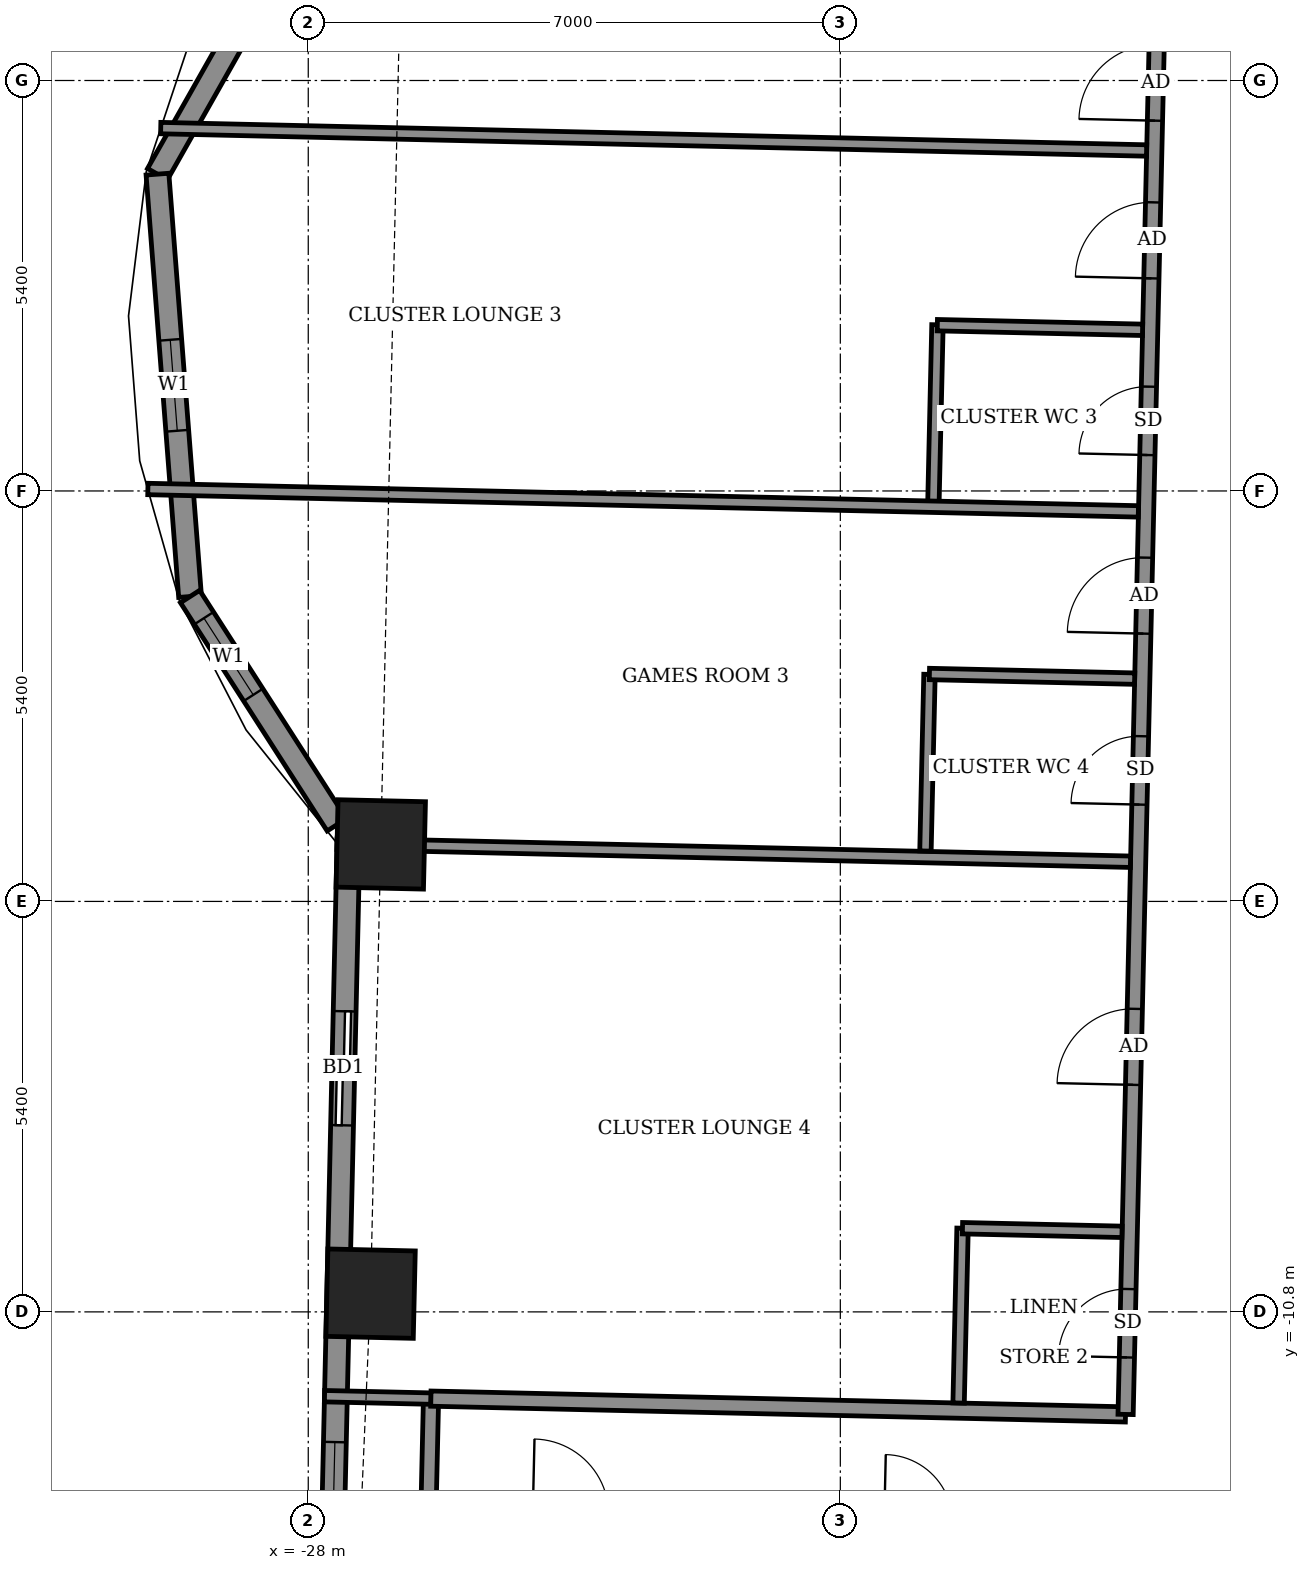
"""IFC4 building model, lengths in metres.
Left out: names, types, materials, properties, quantities, classifications, styles, units other than length and angle.
Written with IfcOpenShell. Run it as: python <this file> out.ifc"""

import sys

from ifc_helpers import new_model, si_unit, direction, frame, frame_2d, origin, origin_2d, place, context, subcontext, project, spatial, rectangle, extrude, element, fill, save


model = new_model("IFC4")
c1 = context("Model", 3, precision=1e-05, world=origin(), true_north=direction((0.0, 1.0)))
c2 = subcontext(c1, "Body", "Model", "MODEL_VIEW")
j1 = project(units=[si_unit("LENGTHUNIT", "METRE"), si_unit("PLANEANGLEUNIT", "RADIAN")], contexts=[c1])
p1 = place(None, origin())
s1 = spatial("IfcSite", under=j1, at=p1, CompositionType="ELEMENT")
p2 = place(p1, origin())
s2 = spatial("IfcBuilding", under=s1, at=p2, CompositionType="ELEMENT")
p3 = place(p2, frame((0.0, 0.0, 197.9)))
s3 = spatial("IfcBuildingStorey", under=s2, at=p3, CompositionType="ELEMENT", Elevation=197.9)
for number, where, z_axis, x_axis in (
    (1, (-27.046, -4.65, -0.55), (0.0, 0.0, 1.0), (-0.023, -1.0, 0.0)),
    (2, (-27.18, -10.56, -0.55), (0.0, 0.0, 1.0), (-0.023, -1.0, 0.0)),
):
    element("IfcColumn", number, at=place(p3, frame(where, z_axis=z_axis, x_axis=x_axis)), inside=s3, PredefinedType="COLUMN", context=c2, shape_type="SweptSolid", body=[
        extrude(rectangle(XDim=1.15, YDim=1.15, at=origin_2d()), origin(), (0.0, 0.0, 1.0), 3.6),
    ])
p4 = place(p3, frame((-27.325, 8.866, 0.0), z_axis=(0.0, 0.0, 1.0), x_axis=(-0.492554919955, -0.870281363025, 0.0)))
e3 = element("IfcWall", 3, at=p4, inside=s3, PredefinedType="SOLIDWALL", context=c2, shape_type="SweptSolid", body=[
    extrude(rectangle(XDim=5.398, YDim=0.3, at=frame_2d((2.699, 0.0))), origin(), (0.0, 0.0, 1.0), 3.05),
])
p5 = place(p4, frame((2.008, 0.0, 0.9)))
e4 = element("IfcOpeningElement", 4, at=p5, cuts=e3, PredefinedType="OPENING", context=c2, shape_type="SweptSolid", body=[
    extrude(rectangle(XDim=1.2, YDim=1.5, at=frame_2d((0.6, 0.75))), frame((0.0, 0.16, 0.0), z_axis=(0.0, -1.0, 0.0), x_axis=(1.0, 0.0, 0.0)), (0.0, 0.0, 1.0), 0.32),
])
p6 = place(p3, frame((-29.984, 4.168, 0.0), z_axis=(0.0, 0.0, 1.0), x_axis=(0.076964476481, -0.997033835614, 0.0)))
e5 = element("IfcWall", 5, at=p6, inside=s3, PredefinedType="SOLIDWALL", context=c2, shape_type="SweptSolid", body=[
    extrude(rectangle(XDim=5.573, YDim=0.3, at=frame_2d((2.787, 0.0))), origin(), (0.0, 0.0, 1.0), 3.05),
])
p7 = place(p6, frame((2.186, 0.0, 0.9)))
e6 = element("IfcOpeningElement", 6, at=p7, cuts=e5, PredefinedType="OPENING", context=c2, shape_type="SweptSolid", body=[
    extrude(rectangle(XDim=1.2, YDim=1.5, at=frame_2d((0.6, 0.75))), frame((0.0, 0.16, 0.0), z_axis=(0.0, -1.0, 0.0), x_axis=(1.0, 0.0, 0.0)), (0.0, 0.0, 1.0), 0.32),
])
p8 = place(p3, frame((-29.555, -1.389, 0.0), z_axis=(0.0, 0.0, 1.0), x_axis=(0.540622779574, -0.8412651248, 0.0)))
e7 = element("IfcWall", 7, at=p8, inside=s3, PredefinedType="SOLIDWALL", context=c2, shape_type="SweptSolid", body=[
    extrude(rectangle(XDim=3.57, YDim=0.3, at=frame_2d((1.785, 0.0))), origin(), (0.0, 0.0, 1.0), 3.05),
])
p9 = place(p8, frame((0.338, 0.0, 0.9)))
e8 = element("IfcOpeningElement", 8, at=p9, cuts=e7, PredefinedType="OPENING", context=c2, shape_type="SweptSolid", body=[
    extrude(rectangle(XDim=1.2, YDim=1.5, at=frame_2d((0.6, 0.75))), frame((0.0, 0.16, 0.0), z_axis=(0.0, -1.0, 0.0), x_axis=(1.0, 0.0, 0.0)), (0.0, 0.0, 1.0), 0.32),
])
p10 = place(p3, frame((-27.47, -4.585, 0.0), z_axis=(0.0, 0.0, 1.0), x_axis=(-0.022686419344, -0.999742630069, 0.0)))
e9 = element("IfcWall", 9, at=p10, inside=s3, PredefinedType="SOLIDWALL", context=c2, shape_type="SweptSolid", body=[
    extrude(rectangle(XDim=11.73, YDim=0.3, at=frame_2d((5.865, 0.0))), origin(), (0.0, 0.0, 1.0), 2.55),
])
p11 = place(p10, frame((2.261, 0.0, 0.0)))
e10 = element("IfcOpeningElement", 10, at=p11, cuts=e9, PredefinedType="OPENING", context=c2, shape_type="SweptSolid", body=[
    extrude(rectangle(XDim=1.5, YDim=2.4, at=frame_2d((0.75, 1.2))), frame((0.0, 0.16, 0.0), z_axis=(0.0, -1.0, 0.0), x_axis=(1.0, 0.0, 0.0)), (0.0, 0.0, 1.0), 0.32),
])
p12 = place(p10, frame((7.93, 0.0, 0.9)))
e11 = element("IfcOpeningElement", 11, at=p12, cuts=e9, PredefinedType="OPENING", context=c2, shape_type="SweptSolid", body=[
    extrude(rectangle(XDim=2.4, YDim=1.5, at=frame_2d((1.2, 0.75))), frame((0.0, 0.16, 0.0), z_axis=(0.0, -1.0, 0.0), x_axis=(1.0, 0.0, 0.0)), (0.0, 0.0, 1.0), 0.32),
])
p13 = place(p3, frame((-30.42, -12.7, 0.0), z_axis=(0.0, 0.0, 1.0), x_axis=(0.022662255828, 0.999743178102, 0.0)))
e12 = element("IfcWall", 12, at=p13, inside=s3, PredefinedType="USERDEFINED", context=c2, shape_type="SweptSolid", body=[
    extrude(rectangle(XDim=6.0, YDim=0.55, at=frame_2d((3.0, 0.0))), origin(), (0.0, 0.0, 1.0), 0.8),
])
p14 = place(p3, frame((-26.419, -13.441, 0.0), z_axis=(0.0, 0.0, 1.0), x_axis=(0.022617910375, 0.999744182344, 0.0)))
e13 = element("IfcWall", 13, at=p14, inside=s3, PredefinedType="PARTITIONING", context=c2, shape_type="SweptSolid", body=[
    extrude(rectangle(XDim=1.5, YDim=0.2, at=frame_2d((0.75, 0.0))), origin(), (0.0, 0.0, 1.0), 3.05),
])
p15 = place(p3, frame((-27.786, -11.909, 0.0), z_axis=(0.0, 0.0, 1.0), x_axis=(0.999740216184, -0.022792545827, 0.0)))
e14 = element("IfcWall", 14, at=p15, inside=s3, PredefinedType="PARTITIONING", context=c2, shape_type="SweptSolid", body=[
    extrude(rectangle(XDim=1.403, YDim=0.15, at=frame_2d((0.702, 0.0))), origin(), (0.0, 0.0, 1.0), 2.55),
])
p16 = place(p3, frame((-26.387, -11.941, 0.0), z_axis=(0.0, 0.0, 1.0), x_axis=(0.999741076645, -0.022754772455, 0.0)))
e15 = element("IfcWall", 15, at=p16, inside=s3, PredefinedType="PARTITIONING", context=c2, shape_type="SweptSolid", body=[
    extrude(rectangle(XDim=9.141, YDim=0.2, at=frame_2d((4.571, 0.0))), origin(), (0.0, 0.0, 1.0), 3.05),
])
p17 = place(p3, frame((-19.444, -11.999, 0.0), z_axis=(0.0, 0.0, 1.0), x_axis=(0.022603288534, 0.999744513037, 0.0)))
e16 = element("IfcWall", 16, at=p17, inside=s3, PredefinedType="PARTITIONING", context=c2, shape_type="SweptSolid", body=[
    extrude(rectangle(XDim=2.301, YDim=0.15, at=frame_2d((1.15, 0.0))), origin(), (0.0, 0.0, 1.0), 3.05),
])
p18 = place(p3, frame((-17.247, -12.149, 0.0), z_axis=(0.0, 0.0, 1.0), x_axis=(0.022698146637, 0.999742363881, 0.0)))
e17 = element("IfcWall", 17, at=p18, inside=s3, PredefinedType="PARTITIONING", context=c2, shape_type="SweptSolid", body=[
    extrude(rectangle(XDim=28.374, YDim=0.2, at=frame_2d((14.187, 0.0))), origin(), (0.0, 0.0, 1.0), 3.05),
])
p19 = place(p18, frame((23.0, 0.0, 0.0)))
e18 = element("IfcOpeningElement", 18, at=p19, cuts=e17, PredefinedType="OPENING", context=c2, shape_type="SweptSolid", body=[
    extrude(rectangle(XDim=1.0, YDim=2.1, at=frame_2d((0.5, 1.05))), frame((0.0, 0.11, 0.0), z_axis=(0.0, -1.0, 0.0), x_axis=(1.0, 0.0, 0.0)), (0.0, 0.0, 1.0), 0.22),
])
p20 = place(p18, frame((26.724, 0.0, 0.0)))
e19 = element("IfcOpeningElement", 19, at=p20, cuts=e17, PredefinedType="OPENING", context=c2, shape_type="SweptSolid", body=[
    extrude(rectangle(XDim=0.9, YDim=2.1, at=frame_2d((0.45, 1.05))), frame((0.0, 0.11, 0.0), z_axis=(0.0, -1.0, 0.0), x_axis=(1.0, 0.0, 0.0)), (0.0, 0.0, 1.0), 0.22),
])
p21 = place(p18, frame((17.025, 0.0, 0.0)))
e20 = element("IfcOpeningElement", 20, at=p21, cuts=e17, PredefinedType="OPENING", context=c2, shape_type="SweptSolid", body=[
    extrude(rectangle(XDim=1.0, YDim=2.1, at=frame_2d((0.5, 1.05))), frame((0.0, 0.11, 0.0), z_axis=(0.0, -1.0, 0.0), x_axis=(1.0, 0.0, 0.0)), (0.0, 0.0, 1.0), 0.22),
])
p22 = place(p18, frame((19.275, 0.0, 0.0)))
e21 = element("IfcOpeningElement", 21, at=p22, cuts=e17, PredefinedType="OPENING", context=c2, shape_type="SweptSolid", body=[
    extrude(rectangle(XDim=0.9, YDim=2.1, at=frame_2d((0.45, 1.05))), frame((0.0, 0.11, 0.0), z_axis=(0.0, -1.0, 0.0), x_axis=(1.0, 0.0, 0.0)), (0.0, 0.0, 1.0), 0.22),
])
p23 = place(p18, frame((14.95, 0.0, 0.0)))
e22 = element("IfcOpeningElement", 22, at=p23, cuts=e17, PredefinedType="OPENING", context=c2, shape_type="SweptSolid", body=[
    extrude(rectangle(XDim=1.0, YDim=2.1, at=frame_2d((0.5, 1.05))), frame((0.0, 0.11, 0.0), z_axis=(0.0, -1.0, 0.0), x_axis=(1.0, 0.0, 0.0)), (0.0, 0.0, 1.0), 0.22),
])
p24 = place(p18, frame((12.625, 0.0, 0.0)))
e23 = element("IfcOpeningElement", 23, at=p24, cuts=e17, PredefinedType="OPENING", context=c2, shape_type="SweptSolid", body=[
    extrude(rectangle(XDim=0.9, YDim=2.1, at=frame_2d((0.45, 1.05))), frame((0.0, 0.11, 0.0), z_axis=(0.0, -1.0, 0.0), x_axis=(1.0, 0.0, 0.0)), (0.0, 0.0, 1.0), 0.22),
])
p25 = place(p18, frame((10.275, 0.0, 0.0)))
e24 = element("IfcOpeningElement", 24, at=p25, cuts=e17, PredefinedType="OPENING", context=c2, shape_type="SweptSolid", body=[
    extrude(rectangle(XDim=1.0, YDim=2.1, at=frame_2d((0.5, 1.05))), frame((0.0, 0.11, 0.0), z_axis=(0.0, -1.0, 0.0), x_axis=(1.0, 0.0, 0.0)), (0.0, 0.0, 1.0), 0.22),
])
p26 = place(p18, frame((8.025, 0.0, 0.0)))
e25 = element("IfcOpeningElement", 25, at=p26, cuts=e17, PredefinedType="OPENING", context=c2, shape_type="SweptSolid", body=[
    extrude(rectangle(XDim=0.9, YDim=2.1, at=frame_2d((0.45, 1.05))), frame((0.0, 0.11, 0.0), z_axis=(0.0, -1.0, 0.0), x_axis=(1.0, 0.0, 0.0)), (0.0, 0.0, 1.0), 0.22),
])
p27 = place(p18, frame((4.337, 0.0, 0.0)))
e26 = element("IfcOpeningElement", 26, at=p27, cuts=e17, PredefinedType="OPENING", context=c2, shape_type="SweptSolid", body=[
    extrude(rectangle(XDim=1.0, YDim=2.1, at=frame_2d((0.5, 1.05))), frame((0.0, 0.11, 0.0), z_axis=(0.0, -1.0, 0.0), x_axis=(1.0, 0.0, 0.0)), (0.0, 0.0, 1.0), 0.22),
])
p28 = place(p18, frame((0.75, 0.0, 0.0)))
e27 = element("IfcOpeningElement", 27, at=p28, cuts=e17, PredefinedType="OPENING", context=c2, shape_type="SweptSolid", body=[
    extrude(rectangle(XDim=0.9, YDim=2.1, at=frame_2d((0.45, 1.05))), frame((0.0, 0.11, 0.0), z_axis=(0.0, -1.0, 0.0), x_axis=(1.0, 0.0, 0.0)), (0.0, 0.0, 1.0), 0.22),
])
p29 = place(p3, frame((-19.393, -9.699, 0.0), z_axis=(0.0, 0.0, 1.0), x_axis=(0.999737616439, -0.022906293375, 0.0)))
e28 = element("IfcWall", 28, at=p29, inside=s3, PredefinedType="PARTITIONING", context=c2, shape_type="SweptSolid", body=[
    extrude(rectangle(XDim=2.1, YDim=0.15, at=frame_2d((1.05, 0.0))), origin(), (0.0, 0.0, 1.0), 3.05),
])
p30 = place(p3, frame((-27.621, -4.641, 0.0), z_axis=(0.0, 0.0, 1.0), x_axis=(0.999742728106, -0.022682098664, 0.0)))
e29 = element("IfcWall", 29, at=p30, inside=s3, PredefinedType="PARTITIONING", context=c2, shape_type="SweptSolid", body=[
    extrude(rectangle(XDim=10.441, YDim=0.15, at=frame_2d((5.22, 0.0))), origin(), (0.0, 0.0, 1.0), 3.05),
])
p31 = place(p3, frame((-19.88, -4.737, 0.0), z_axis=(0.0, 0.0, 1.0), x_axis=(0.02279059109, 0.999740260747, 0.0)))
e30 = element("IfcWall", 30, at=p31, inside=s3, PredefinedType="PARTITIONING", context=c2, shape_type="SweptSolid", body=[
    extrude(rectangle(XDim=2.324, YDim=0.15, at=frame_2d((1.162, 0.0))), origin(), (0.0, 0.0, 1.0), 3.05),
])
p32 = place(p3, frame((-19.828, -2.408, 0.0), z_axis=(0.0, 0.0, 1.0), x_axis=(0.99974458177, -0.022600248254, 0.0)))
e31 = element("IfcWall", 31, at=p32, inside=s3, PredefinedType="PARTITIONING", context=c2, shape_type="SweptSolid", body=[
    extrude(rectangle(XDim=2.701, YDim=0.15, at=frame_2d((1.35, 0.0))), origin(), (0.0, 0.0, 1.0), 3.05),
])
p33 = place(p3, frame((-19.775, -0.138, 0.0), z_axis=(0.0, 0.0, 1.0), x_axis=(0.02279059109, 0.999740260747, 0.0)))
e32 = element("IfcWall", 32, at=p33, inside=s3, PredefinedType="PARTITIONING", context=c2, shape_type="SweptSolid", body=[
    extrude(rectangle(XDim=2.324, YDim=0.15, at=frame_2d((1.162, 0.0))), origin(), (0.0, 0.0, 1.0), 3.05),
])
p34 = place(p3, frame((-30.11, 0.026, 0.0), z_axis=(0.0, 0.0, 1.0), x_axis=(0.999743987427, -0.022626524343, 0.0)))
e33 = element("IfcWall", 33, at=p34, inside=s3, PredefinedType="PARTITIONING", context=c2, shape_type="SweptSolid", body=[
    extrude(rectangle(XDim=13.034, YDim=0.15, at=frame_2d((6.517, 0.0))), origin(), (0.0, 0.0, 1.0), 2.1),
])
p35 = place(p3, frame((-19.724, 2.181, 0.0), z_axis=(0.0, 0.0, 1.0), x_axis=(0.999746666054, -0.022507858937, 0.0)))
e34 = element("IfcWall", 34, at=p35, inside=s3, PredefinedType="PARTITIONING", context=c2, shape_type="SweptSolid", body=[
    extrude(rectangle(XDim=2.701, YDim=0.15, at=frame_2d((1.351, 0.0))), origin(), (0.0, 0.0, 1.0), 3.05),
])
p36 = place(p3, frame((-29.941, 4.774, 0.0), z_axis=(0.0, 0.0, 1.0), x_axis=(0.999741573163, -0.022732947207, 0.0)))
e35 = element("IfcWall", 35, at=p36, inside=s3, PredefinedType="PARTITIONING", context=c2, shape_type="SweptSolid", body=[
    extrude(rectangle(XDim=12.973, YDim=0.15, at=frame_2d((6.487, 0.0))), origin(), (0.0, 0.0, 1.0), 2.1),
])
p37 = place(p7, origin())
e36 = element("IfcWindow", 36, at=p37, inside=s3, PartitioningType="SINGLE_PANEL", PredefinedType="WINDOW", context=c2, shape_type="SweptSolid", body=[
    extrude(rectangle(XDim=1.2, YDim=1.5, at=frame_2d((0.6, 0.75))), frame((0.0, 0.03, 0.0), z_axis=(0.0, -1.0, 0.0), x_axis=(1.0, 0.0, 0.0)), (0.0, 0.0, 1.0), 0.06),
])
fill(e6, e36)
p38 = place(p9, origin())
e37 = element("IfcWindow", 37, at=p38, inside=s3, PartitioningType="SINGLE_PANEL", PredefinedType="WINDOW", context=c2, shape_type="SweptSolid", body=[
    extrude(rectangle(XDim=1.2, YDim=1.5, at=frame_2d((0.6, 0.75))), frame((0.0, 0.03, 0.0), z_axis=(0.0, -1.0, 0.0), x_axis=(1.0, 0.0, 0.0)), (0.0, 0.0, 1.0), 0.06),
])
fill(e8, e37)
p39 = place(p11, origin())
e38 = element("IfcDoor", 38, at=p39, inside=s3, OperationType="SLIDING_TO_LEFT", PredefinedType="DOOR", context=c2, shape_type="SweptSolid", body=[
    extrude(rectangle(XDim=1.5, YDim=2.4, at=frame_2d((0.75, 1.2))), frame((0.0, 0.025, 0.0), z_axis=(0.0, -1.0, 0.0), x_axis=(1.0, 0.0, 0.0)), (0.0, 0.0, 1.0), 0.05),
])
fill(e10, e38)
p40 = place(p12, origin())
e39 = element("IfcWindow", 39, at=p40, inside=s3, PartitioningType="DOUBLE_PANEL_VERTICAL", PredefinedType="WINDOW", context=c2, shape_type="SweptSolid", body=[
    extrude(rectangle(XDim=2.4, YDim=1.5, at=frame_2d((1.2, 0.75))), frame((0.0, 0.03, 0.0), z_axis=(0.0, -1.0, 0.0), x_axis=(1.0, 0.0, 0.0)), (0.0, 0.0, 1.0), 0.06),
])
fill(e11, e39)
p41 = place(p21, origin())
e40 = element("IfcDoor", 40, at=p41, inside=s3, OperationType="SINGLE_SWING_RIGHT", PredefinedType="DOOR", context=c2, shape_type="SweptSolid", body=[
    extrude(rectangle(XDim=1.0, YDim=2.1, at=frame_2d((0.5, 1.05))), frame((0.0, 0.025, 0.0), z_axis=(0.0, -1.0, 0.0), x_axis=(1.0, 0.0, 0.0)), (0.0, 0.0, 1.0), 0.05),
])
fill(e20, e40)
p42 = place(p23, origin())
e41 = element("IfcDoor", 41, at=p42, inside=s3, OperationType="SINGLE_SWING_LEFT", PredefinedType="DOOR", context=c2, shape_type="SweptSolid", body=[
    extrude(rectangle(XDim=1.0, YDim=2.1, at=frame_2d((0.5, 1.05))), frame((0.0, 0.025, 0.0), z_axis=(0.0, -1.0, 0.0), x_axis=(1.0, 0.0, 0.0)), (0.0, 0.0, 1.0), 0.05),
])
fill(e22, e41)
p43 = place(p24, origin())
e42 = element("IfcDoor", 42, at=p43, inside=s3, OperationType="SINGLE_SWING_RIGHT", PredefinedType="DOOR", context=c2, shape_type="SweptSolid", body=[
    extrude(rectangle(XDim=0.9, YDim=2.1, at=frame_2d((0.45, 1.05))), frame((0.0, 0.025, 0.0), z_axis=(0.0, -1.0, 0.0), x_axis=(1.0, 0.0, 0.0)), (0.0, 0.0, 1.0), 0.05),
])
fill(e23, e42)
p44 = place(p25, origin())
e43 = element("IfcDoor", 43, at=p44, inside=s3, OperationType="SINGLE_SWING_RIGHT", PredefinedType="DOOR", context=c2, shape_type="SweptSolid", body=[
    extrude(rectangle(XDim=1.0, YDim=2.1, at=frame_2d((0.5, 1.05))), frame((0.0, 0.025, 0.0), z_axis=(0.0, -1.0, 0.0), x_axis=(1.0, 0.0, 0.0)), (0.0, 0.0, 1.0), 0.05),
])
fill(e24, e43)
p45 = place(p26, origin())
e44 = element("IfcDoor", 44, at=p45, inside=s3, OperationType="SINGLE_SWING_LEFT", PredefinedType="DOOR", context=c2, shape_type="SweptSolid", body=[
    extrude(rectangle(XDim=0.9, YDim=2.1, at=frame_2d((0.45, 1.05))), frame((0.0, 0.025, 0.0), z_axis=(0.0, -1.0, 0.0), x_axis=(1.0, 0.0, 0.0)), (0.0, 0.0, 1.0), 0.05),
])
fill(e25, e44)
p46 = place(p27, origin())
e45 = element("IfcDoor", 45, at=p46, inside=s3, OperationType="SINGLE_SWING_LEFT", PredefinedType="DOOR", context=c2, shape_type="SweptSolid", body=[
    extrude(rectangle(XDim=1.0, YDim=2.1, at=frame_2d((0.5, 1.05))), frame((0.0, 0.025, 0.0), z_axis=(0.0, -1.0, 0.0), x_axis=(1.0, 0.0, 0.0)), (0.0, 0.0, 1.0), 0.05),
])
fill(e26, e45)
p47 = place(p28, origin())
e46 = element("IfcDoor", 46, at=p47, inside=s3, OperationType="SINGLE_SWING_RIGHT", PredefinedType="DOOR", context=c2, shape_type="SweptSolid", body=[
    extrude(rectangle(XDim=0.9, YDim=2.1, at=frame_2d((0.45, 1.05))), frame((0.0, 0.025, 0.0), z_axis=(0.0, -1.0, 0.0), x_axis=(1.0, 0.0, 0.0)), (0.0, 0.0, 1.0), 0.05),
])
fill(e27, e46)
save(model, sys.argv[1])
